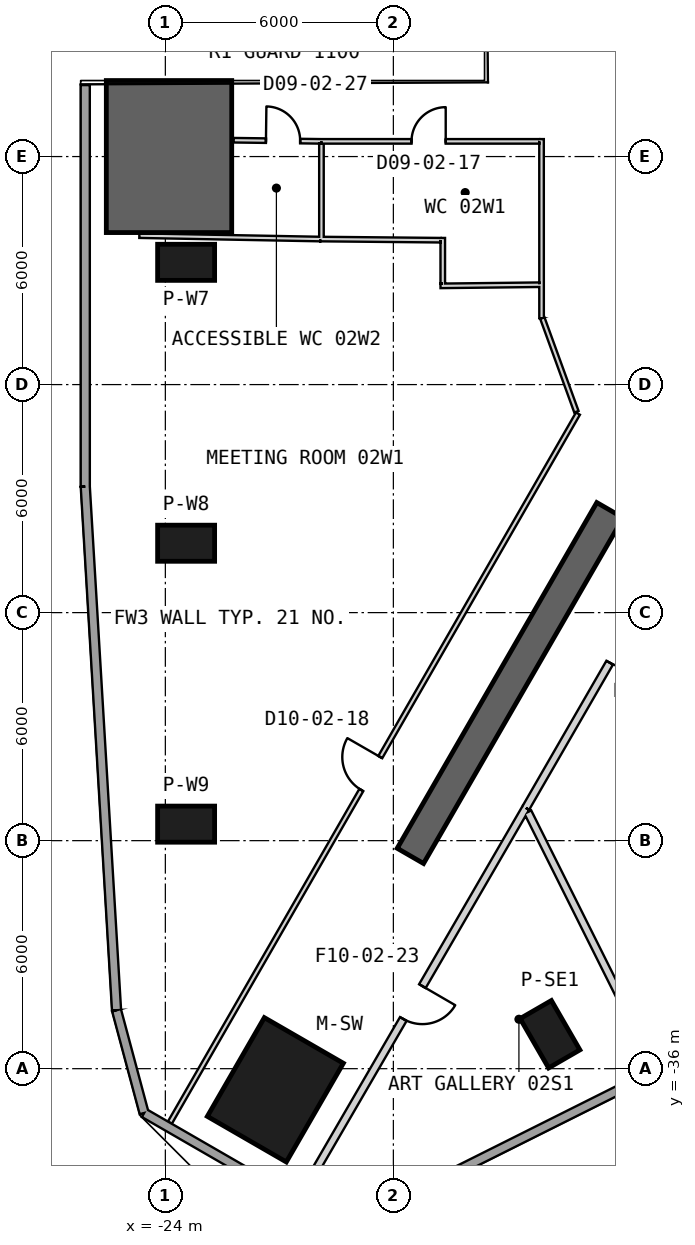
"""IFC4 building model, lengths in metres.
Left out: names, types, materials, properties, quantities, classifications, styles, units other than length and angle.
Written with IfcOpenShell. Run it as: python <this file> out.ifc"""

import sys

from ifc_helpers import new_model, si_unit, direction, frame, frame_2d, origin, origin_2d, place, context, subcontext, project, spatial, polyline, rectangle, outline, extrude, element, fill, save


model = new_model("IFC4")
c1 = context("Model", 3, precision=1e-05, world=origin(), true_north=direction((0.0, 1.0)))
c2 = subcontext(c1, "Body", "Model", "MODEL_VIEW")
j1 = project(units=[si_unit("LENGTHUNIT", "METRE"), si_unit("PLANEANGLEUNIT", "RADIAN")], contexts=[c1])
p1 = place(None, origin())
s1 = spatial("IfcSite", under=j1, at=p1, CompositionType="ELEMENT")
p2 = place(p1, origin())
s2 = spatial("IfcBuilding", under=s1, at=p2, CompositionType="ELEMENT")
p3 = place(p2, frame((0.0, 0.0, 15.5)))
s3 = spatial("IfcBuildingStorey", under=s2, at=p3, CompositionType="ELEMENT", Elevation=15.5)
p4 = place(p3, frame((-21.106, -36.556, 0.0), z_axis=(0.0, 0.0, 1.0), x_axis=(-0.5, -0.866025403784, 0.0)))
e1 = element("IfcColumn", 1, at=p4, inside=s3, PredefinedType="COLUMN", context=c2, shape_type="SweptSolid", body=[
    extrude(rectangle(XDim=3.0, YDim=2.4, at=origin_2d()), origin(), (0.0, 0.0, 1.0), 6.0),
])
for number, where, z_axis, x_axis in (
    (2, (-23.453, -14.783, 0.0), (0.0, 0.0, 1.0), (-1.0, 0.0, 0.0)),
    (3, (-23.453, -22.174, 0.0), (0.0, 0.0, 1.0), (-1.0, 0.0, 0.0)),
    (4, (-23.453, -29.566, 0.0), (0.0, 0.0, 1.0), (-1.0, 0.0, 0.0)),
    (5, (-13.878, -35.094, 0.0), (0.0, 0.0, 1.0), (0.5, -0.866, 0.0)),
):
    element("IfcColumn", number, at=place(p3, frame(where, z_axis=z_axis, x_axis=x_axis)), inside=s3, PredefinedType="COLUMN", context=c2, shape_type="SweptSolid", body=[
        extrude(rectangle(XDim=1.5, YDim=0.95, at=origin_2d()), origin(), (0.0, 0.0, 1.0), 6.0),
    ])
p5 = place(p3, frame((-10.575, -18.316, 0.0), z_axis=(0.0, 0.0, 1.0), x_axis=(-0.499996575515, -0.866027380903, 0.0)))
e6 = element("IfcWall", 6, at=p5, inside=s3, PredefinedType="SHEAR", context=c2, shape_type="SweptSolid", body=[
    extrude(rectangle(XDim=13.954, YDim=0.8, at=frame_2d((6.977, 0.0))), origin(), (0.0, 0.0, 1.0), 6.0),
])
p6 = place(p5, frame((2.05, 0.0, 0.0)))
e7 = element("IfcOpeningElement", 7, at=p6, cuts=e6, PredefinedType="OPENING", context=c2, shape_type="SweptSolid", body=[
    extrude(rectangle(XDim=1.4, YDim=2.4, at=frame_2d((0.7, 1.2))), frame((0.0, 0.41, 0.0), z_axis=(0.0, -1.0, 0.0), x_axis=(1.0, 0.0, 0.0)), (0.0, 0.0, 1.0), 0.82),
])
p7 = place(p3, origin())
e8 = element("IfcWall", 8, at=p7, inside=s3, PredefinedType="SHEAR", context=c2, shape_type="SweptSolid", body=[
    extrude(outline(polyline([(-25.553, -10.0), (-25.553, -14.0), (-22.253, -14.0), (-22.253, -10.0), (-25.553, -10.0)])), origin(), (0.0, 0.0, 1.0), 6.0),
])
p8 = place(p3, frame((-26.108, -10.119, 0.0), z_axis=(0.0, 0.0, 1.0), x_axis=(6.9319284e-05, -0.999999997597, 0.0)))
e9 = element("IfcWall", 9, at=p8, inside=s3, PredefinedType="SOLIDWALL", context=c2, shape_type="SweptSolid", body=[
    extrude(rectangle(XDim=10.566, YDim=0.24, at=frame_2d((5.283, 0.0))), origin(), (0.0, 0.0, 1.0), 5.7),
])
p9 = place(p3, frame((-26.107, -20.685, 0.0), z_axis=(0.0, 0.0, 1.0), x_axis=(0.059596169304, -0.998222568671, 0.0)))
e10 = element("IfcWall", 10, at=p9, inside=s3, PredefinedType="SOLIDWALL", context=c2, shape_type="SweptSolid", body=[
    extrude(rectangle(XDim=13.801, YDim=0.24, at=frame_2d((6.901, 0.0))), origin(), (0.0, 0.0, 1.0), 5.7),
])
p10 = place(p3, frame((-25.284, -34.462, 0.0), z_axis=(0.0, 0.0, 1.0), x_axis=(0.258850842196, -0.965917305723, 0.0)))
e11 = element("IfcWall", 11, at=p10, inside=s3, PredefinedType="SOLIDWALL", context=c2, shape_type="SweptSolid", body=[
    extrude(rectangle(XDim=2.8, YDim=0.24, at=frame_2d((1.4, 0.0))), origin(), (0.0, 0.0, 1.0), 5.7),
])
p11 = place(p3, frame((-24.56, -37.167, 0.0), z_axis=(0.0, 0.0, 1.0), x_axis=(0.866010734295, -0.500025407441, 0.0)))
e12 = element("IfcWall", 12, at=p11, inside=s3, PredefinedType="SOLIDWALL", context=c2, shape_type="SweptSolid", body=[
    extrude(rectangle(XDim=5.371, YDim=0.24, at=frame_2d((2.686, 0.0))), origin(), (0.0, 0.0, 1.0), 5.7),
])
p12 = place(p3, frame((-17.203, -39.128, 0.0), z_axis=(0.0, 0.0, 1.0), x_axis=(0.894377655106, 0.447312653573, 0.0)))
e13 = element("IfcWall", 13, at=p12, inside=s3, PredefinedType="SOLIDWALL", context=c2, shape_type="SweptSolid", body=[
    extrude(rectangle(XDim=13.802, YDim=0.24, at=frame_2d((6.901, 0.0))), origin(), (0.0, 0.0, 1.0), 5.7),
])
p13 = place(p3, frame((-14.101, -11.54, 0.0), z_axis=(0.0, 0.0, 1.0), x_axis=(0.000155392104, -0.999999987927, 0.0)))
e14 = element("IfcWall", 14, at=p13, inside=s3, PredefinedType="PARTITIONING", context=c2, shape_type="SweptSolid", body=[
    extrude(rectangle(XDim=4.713, YDim=0.12, at=frame_2d((2.357, 0.0))), origin(), (0.0, 0.0, 1.0), 4.88),
])
p14 = place(p3, frame((-19.892, -11.6, 0.0), z_axis=(0.0, 0.0, 1.0), x_axis=(0.999999999093, -4.2596694e-05, 0.0)))
e15 = element("IfcWall", 15, at=p14, inside=s3, PredefinedType="PARTITIONING", context=c2, shape_type="SweptSolid", body=[
    extrude(rectangle(XDim=5.731, YDim=0.12, at=frame_2d((2.866, 0.0))), origin(), (0.0, 0.0, 1.0), 5.17),
])
p15 = place(p14, frame((2.37, 0.0, 0.0)))
e16 = element("IfcOpeningElement", 16, at=p15, cuts=e15, PredefinedType="OPENING", context=c2, shape_type="SweptSolid", body=[
    extrude(rectangle(XDim=0.9, YDim=2.1, at=frame_2d((0.45, 1.05))), frame((0.0, 0.07, 0.0), z_axis=(0.0, -1.0, 0.0), x_axis=(1.0, 0.0, 0.0)), (0.0, 0.0, 1.0), 0.14),
])
p16 = place(p3, frame((-22.203, -11.57, 0.0), z_axis=(0.0, 0.0, 1.0), x_axis=(0.999915590323, -0.012992775999, 0.0)))
e17 = element("IfcWall", 17, at=p16, inside=s3, PredefinedType="PARTITIONING", context=c2, shape_type="SweptSolid", body=[
    extrude(rectangle(XDim=2.311, YDim=0.12, at=frame_2d((1.156, 0.0))), origin(), (0.0, 0.0, 1.0), 5.7),
])
p17 = place(p16, frame((0.851, 0.0, 0.0)))
e18 = element("IfcOpeningElement", 18, at=p17, cuts=e17, PredefinedType="OPENING", context=c2, shape_type="SweptSolid", body=[
    extrude(rectangle(XDim=0.9, YDim=2.1, at=frame_2d((0.45, 1.05))), frame((0.0, 0.07, 0.0), z_axis=(0.0, -1.0, 0.0), x_axis=(1.0, 0.0, 0.0)), (0.0, 0.0, 1.0), 0.14),
])
p18 = place(p3, frame((-23.881, -37.42, 0.0), z_axis=(0.0, 0.0, 1.0), x_axis=(0.49883822201, 0.866695118402, 0.0)))
e19 = element("IfcWall", 19, at=p18, inside=s3, PredefinedType="PARTITIONING", context=c2, shape_type="SweptSolid", body=[
    extrude(rectangle(XDim=21.527, YDim=0.12, at=frame_2d((10.763, 0.0))), origin(), (0.0, 0.0, 1.0), 5.7),
])
p19 = place(p18, frame((10.099, 0.0, 0.0)))
e20 = element("IfcOpeningElement", 20, at=p19, cuts=e19, PredefinedType="OPENING", context=c2, shape_type="SweptSolid", body=[
    extrude(rectangle(XDim=1.0, YDim=2.1, at=frame_2d((0.5, 1.05))), frame((0.0, 0.07, 0.0), z_axis=(0.0, -1.0, 0.0), x_axis=(1.0, 0.0, 0.0)), (0.0, 0.0, 1.0), 0.14),
])
p20 = place(p3, frame((-14.08, -16.25, 0.0), z_axis=(0.0, 0.0, 1.0), x_axis=(0.34184025858, -0.939758073982, 0.0)))
e21 = element("IfcWall", 21, at=p20, inside=s3, PredefinedType="PARTITIONING", context=c2, shape_type="SweptSolid", body=[
    extrude(rectangle(XDim=2.622, YDim=0.12, at=frame_2d((1.311, 0.0))), origin(), (0.0, 0.0, 1.0), 4.78),
])
p21 = place(p3, frame((-19.892, -11.66, 0.0), z_axis=(0.0, 0.0, 1.0), x_axis=(0.0, -1.0, 0.0)))
e22 = element("IfcWall", 22, at=p21, inside=s3, PredefinedType="PARTITIONING", context=c2, shape_type="SweptSolid", body=[
    extrude(rectangle(XDim=2.541, YDim=0.12, at=frame_2d((1.271, 0.0))), origin(), (0.0, 0.0, 1.0), 5.17),
])
p22 = place(p3, frame((-14.16, -15.372, 0.0), z_axis=(0.0, 0.0, 1.0), x_axis=(-0.999933313555, -0.011548525593, 0.0)))
e23 = element("IfcWall", 23, at=p22, inside=s3, PredefinedType="PARTITIONING", context=c2, shape_type="SweptSolid", body=[
    extrude(rectangle(XDim=2.6, YDim=0.12, at=frame_2d((1.3, 0.0))), origin(), (0.0, 0.0, 1.0), 4.88),
])
p23 = place(p3, frame((-16.7, -15.342, 0.0), z_axis=(0.0, 0.0, 1.0), x_axis=(0.0, 1.0, 0.0)))
e24 = element("IfcWall", 24, at=p23, inside=s3, PredefinedType="PARTITIONING", context=c2, shape_type="SweptSolid", body=[
    extrude(rectangle(XDim=1.2, YDim=0.12, at=frame_2d((0.6, 0.0))), origin(), (0.0, 0.0, 1.0), 5.7),
])
p24 = place(p3, frame((-16.76, -14.201, 0.0), z_axis=(0.0, 0.0, 1.0), x_axis=(-0.999954917278, 0.009495441583, 0.0)))
e25 = element("IfcWall", 25, at=p24, inside=s3, PredefinedType="PARTITIONING", context=c2, shape_type="SweptSolid", body=[
    extrude(rectangle(XDim=3.163, YDim=0.12, at=frame_2d((1.581, 0.0))), origin(), (0.0, 0.0, 1.0), 5.7),
])
p25 = place(p3, frame((-19.922, -14.171, 0.0), z_axis=(0.0, 0.0, 1.0), x_axis=(-0.999824012801, 0.018760155269, 0.0)))
e26 = element("IfcWall", 26, at=p25, inside=s3, PredefinedType="PARTITIONING", context=c2, shape_type="SweptSolid", body=[
    extrude(rectangle(XDim=4.763, YDim=0.12, at=frame_2d((2.381, 0.0))), origin(), (0.0, 0.0, 1.0), 5.17),
])
p26 = place(p3, frame((-14.514, -29.139, 0.0), z_axis=(0.0, 0.0, 1.0), x_axis=(-0.502061989067, -0.864831636294, 0.0)))
e27 = element("IfcWall", 27, at=p26, inside=s3, PredefinedType="PARTITIONING", context=c2, shape_type="SweptSolid", body=[
    extrude(rectangle(XDim=11.855, YDim=0.2, at=frame_2d((5.928, 0.0))), origin(), (0.0, 0.0, 1.0), 5.7),
])
p27 = place(p26, frame((5.421, 0.0, 0.0)))
e28 = element("IfcOpeningElement", 28, at=p27, cuts=e27, PredefinedType="OPENING", context=c2, shape_type="SweptSolid", body=[
    extrude(rectangle(XDim=1.0, YDim=2.1, at=frame_2d((0.5, 1.05))), frame((0.0, 0.11, 0.0), z_axis=(0.0, -1.0, 0.0), x_axis=(1.0, 0.0, 0.0)), (0.0, 0.0, 1.0), 0.22),
])
p28 = place(p3, frame((-9.758, -20.901, 0.0), z_axis=(0.0, 0.0, 1.0), x_axis=(-0.499997931106, -0.866026598257, 0.0)))
e29 = element("IfcWall", 29, at=p28, inside=s3, PredefinedType="PARTITIONING", context=c2, shape_type="SweptSolid", body=[
    extrude(rectangle(XDim=9.513, YDim=0.2, at=frame_2d((4.756, 0.0))), origin(), (0.0, 0.0, 1.0), 5.7),
])
p29 = place(p28, frame((4.1, 0.0, 0.0)))
e30 = element("IfcOpeningElement", 30, at=p29, cuts=e29, PredefinedType="OPENING", context=c2, shape_type="SweptSolid", body=[
    extrude(rectangle(XDim=1.0, YDim=2.1, at=frame_2d((0.5, 1.05))), frame((0.0, 0.11, 0.0), z_axis=(0.0, -1.0, 0.0), x_axis=(1.0, 0.0, 0.0)), (0.0, 0.0, 1.0), 0.22),
])
p30 = place(p3, frame((-14.462, -29.248, 0.0), z_axis=(0.0, 0.0, 1.0), x_axis=(0.447304919826, -0.894381523009, 0.0)))
e31 = element("IfcWall", 31, at=p30, inside=s3, PredefinedType="PARTITIONING", context=c2, shape_type="SweptSolid", body=[
    extrude(rectangle(XDim=7.485, YDim=0.2, at=frame_2d((3.743, 0.0))), origin(), (0.0, 0.0, 1.0), 4.78),
])
p31 = place(p15, origin())
e32 = element("IfcDoor", 32, at=p31, inside=s3, OperationType="SINGLE_SWING_RIGHT", PredefinedType="NOTDEFINED", context=c2, shape_type="SweptSolid", body=[
    extrude(rectangle(XDim=0.9, YDim=2.1, at=frame_2d((0.45, 1.05))), frame((0.0, 0.025, 0.0), z_axis=(0.0, -1.0, 0.0), x_axis=(1.0, 0.0, 0.0)), (0.0, 0.0, 1.0), 0.05),
])
fill(e16, e32)
p32 = place(p19, origin())
e33 = element("IfcDoor", 33, at=p32, inside=s3, OperationType="SINGLE_SWING_RIGHT", PredefinedType="NOTDEFINED", context=c2, shape_type="SweptSolid", body=[
    extrude(rectangle(XDim=1.0, YDim=2.1, at=frame_2d((0.5, 1.05))), frame((0.0, 0.025, 0.0), z_axis=(0.0, -1.0, 0.0), x_axis=(1.0, 0.0, 0.0)), (0.0, 0.0, 1.0), 0.05),
])
fill(e20, e33)
p33 = place(p27, origin())
e34 = element("IfcDoor", 34, at=p33, inside=s3, OperationType="SINGLE_SWING_LEFT", PredefinedType="USERDEFINED", context=c2, shape_type="SweptSolid", body=[
    extrude(rectangle(XDim=1.0, YDim=2.1, at=frame_2d((0.5, 1.05))), frame((0.0, 0.025, 0.0), z_axis=(0.0, -1.0, 0.0), x_axis=(1.0, 0.0, 0.0)), (0.0, 0.0, 1.0), 0.05),
])
fill(e28, e34)
p34 = place(p29, origin())
e35 = element("IfcDoor", 35, at=p34, inside=s3, OperationType="SINGLE_SWING_LEFT", PredefinedType="USERDEFINED", context=c2, shape_type="SweptSolid", body=[
    extrude(rectangle(XDim=1.0, YDim=2.1, at=frame_2d((0.5, 1.05))), frame((0.0, 0.025, 0.0), z_axis=(0.0, -1.0, 0.0), x_axis=(1.0, 0.0, 0.0)), (0.0, 0.0, 1.0), 0.05),
])
fill(e30, e35)
p35 = place(p17, origin())
e36 = element("IfcDoor", 36, at=p35, inside=s3, OperationType="SINGLE_SWING_LEFT", PredefinedType="NOTDEFINED", context=c2, shape_type="SweptSolid", body=[
    extrude(rectangle(XDim=0.9, YDim=2.1, at=frame_2d((0.45, 1.05))), frame((0.0, 0.025, 0.0), z_axis=(0.0, -1.0, 0.0), x_axis=(1.0, 0.0, 0.0)), (0.0, 0.0, 1.0), 0.05),
])
fill(e18, e36)
p36 = place(p6, origin())
e37 = element("IfcDoor", 37, at=p36, inside=s3, OperationType="DOUBLE_DOOR_SINGLE_SWING", PredefinedType="NOTDEFINED", context=c2, shape_type="SweptSolid", body=[
    extrude(rectangle(XDim=1.4, YDim=2.4, at=frame_2d((0.7, 1.2))), frame((0.0, 0.025, 0.0), z_axis=(0.0, -1.0, 0.0), x_axis=(1.0, 0.0, 0.0)), (0.0, 0.0, 1.0), 0.05),
])
fill(e7, e37)
save(model, sys.argv[1])
